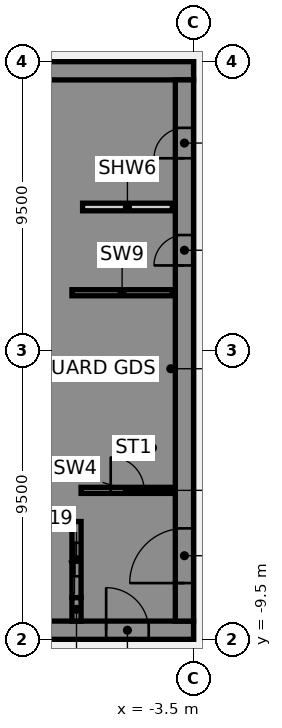
"""IFC4 building model, lengths in metres.
Left out: names, types, materials, properties, quantities, classifications, styles, units other than length and angle.
Written with IfcOpenShell. Run it as: python <this file> out.ifc"""

import sys

from ifc_helpers import new_model, si_unit, direction, frame, frame_2d, origin, place, context, subcontext, project, spatial, polyline, rectangle, outline, extrude, element, fill, save


model = new_model("IFC4")
c1 = context("Model", 3, precision=1e-05, world=origin(), true_north=direction((0.0, 1.0)))
c2 = subcontext(c1, "Body", "Model", "MODEL_VIEW")
j1 = project(units=[si_unit("LENGTHUNIT", "METRE"), si_unit("PLANEANGLEUNIT", "RADIAN")], contexts=[c1])
p1 = place(None, origin())
s1 = spatial("IfcSite", under=j1, at=p1, CompositionType="ELEMENT")
p2 = place(p1, origin())
s2 = spatial("IfcBuilding", under=s1, at=p2, CompositionType="ELEMENT")
p3 = place(p2, frame((0.0, 0.0, 83.5)))
s3 = spatial("IfcBuildingStorey", under=s2, at=p3, CompositionType="ELEMENT", Elevation=83.5)
p4 = place(p3, frame((-16.5, -9.2, 0.0), z_axis=(0.0, 0.0, 1.0), x_axis=(1.0, 0.0, 0.0)))
e1 = element("IfcWall", 1, at=p4, inside=s3, PredefinedType="SHEAR", context=c2, shape_type="SweptSolid", body=[
    extrude(rectangle(XDim=13.0, YDim=0.6, at=frame_2d((6.5, 0.0))), origin(), (0.0, 0.0, 1.0), 3.61),
])
p5 = place(p4, frame((4.15, 0.0, 0.0)))
e2 = element("IfcOpeningElement", 2, at=p5, cuts=e1, PredefinedType="OPENING", context=c2, shape_type="SweptSolid", body=[
    extrude(rectangle(XDim=1.4, YDim=2.1, at=frame_2d((0.7, 1.05))), frame((0.0, 0.31, 0.0), z_axis=(0.0, -1.0, 0.0), x_axis=(1.0, 0.0, 0.0)), (0.0, 0.0, 1.0), 0.62),
])
p6 = place(p4, frame((10.125, 0.0, 0.0)))
e3 = element("IfcOpeningElement", 3, at=p6, cuts=e1, PredefinedType="OPENING", context=c2, shape_type="SweptSolid", body=[
    extrude(rectangle(XDim=1.4, YDim=2.1, at=frame_2d((0.7, 1.05))), frame((0.0, 0.31, 0.0), z_axis=(0.0, -1.0, 0.0), x_axis=(1.0, 0.0, 0.0)), (0.0, 0.0, 1.0), 0.62),
])
p7 = place(p3, frame((-16.5, 9.2, 0.0), z_axis=(0.0, 0.0, 1.0), x_axis=(1.0, 0.0, 0.0)))
e4 = element("IfcWall", 4, at=p7, inside=s3, PredefinedType="SHEAR", context=c2, shape_type="SweptSolid", body=[
    extrude(rectangle(XDim=13.0, YDim=0.6, at=frame_2d((6.5, 0.0))), origin(), (0.0, 0.0, 1.0), 3.61),
])
p8 = place(p3, origin())
e5 = element("IfcWall", 5, at=p8, inside=s3, PredefinedType="SHEAR", context=c2, shape_type="SweptSolid", body=[
    extrude(outline(polyline([(-9.8, -5.375), (-9.8, -5.625), (-7.5, -5.625), (-7.2, -5.625), (-7.2, 8.9), (-7.5, 8.9), (-9.8, 8.9), (-9.8, 8.125), (-7.5, 8.125), (-7.5, 5.625), (-9.8, 5.625), (-9.8, 5.375), (-7.5, 5.375), (-7.5, 2.875), (-9.8, 2.875), (-9.8, 2.625), (-7.5, 2.625), (-7.5, 0.125), (-9.8, 0.125), (-9.8, -0.125), (-7.5, -0.125), (-7.5, -2.625), (-9.8, -2.625), (-9.8, -2.875), (-7.5, -2.875), (-7.5, -5.375), (-9.8, -5.375)])), origin(), (0.0, 0.0, 1.0), 3.61),
])
p9 = place(p3, origin())
e6 = element("IfcWall", 6, at=p9, inside=s3, PredefinedType="SHEAR", context=c2, shape_type="SweptSolid", body=[
    extrude(outline(polyline([(-7.5, -8.125), (-9.55, -8.125), (-9.55, -5.625), (-9.8, -5.625), (-9.8, -8.125), (-9.8, -8.9), (-7.5, -8.9), (-7.5, -8.125)])), origin(), (0.0, 0.0, 1.0), 3.61),
])
p10 = place(p3, frame((-7.35, -8.9, 0.0), z_axis=(0.0, 0.0, 1.0), x_axis=(0.0, 1.0, 0.0)))
e7 = element("IfcWall", 7, at=p10, inside=s3, PredefinedType="SHEAR", context=c2, shape_type="SweptSolid", body=[
    extrude(rectangle(XDim=0.775, YDim=0.3, at=frame_2d((0.387, 0.0))), origin(), (0.0, 0.0, 1.0), 3.61),
])
p11 = place(p3, frame((-7.5, 1.9, 0.0), z_axis=(0.0, 0.0, 1.0), x_axis=(1.0, 0.0, 0.0)))
e8 = element("IfcWall", 8, at=p11, inside=s3, PredefinedType="SHEAR", context=c2, shape_type="SweptSolid", body=[
    extrude(rectangle(XDim=3.3, YDim=0.2, at=frame_2d((1.65, 0.0))), origin(), (0.0, 0.0, 1.0), 3.61),
])
p12 = place(p3, frame((-7.35, -8.125, 0.0), z_axis=(0.0, 0.0, 1.0), x_axis=(0.0, 1.0, 0.0)))
e9 = element("IfcWall", 9, at=p12, inside=s3, PredefinedType="SHEAR", context=c2, shape_type="SweptSolid", body=[
    extrude(rectangle(XDim=2.5, YDim=0.3, at=frame_2d((1.25, 0.0))), origin(), (0.0, 0.0, 1.0), 3.61),
])
p13 = place(p12, frame((0.7, 0.0, 0.0)))
e10 = element("IfcOpeningElement", 10, at=p13, cuts=e9, PredefinedType="OPENING", context=c2, shape_type="SweptSolid", body=[
    extrude(rectangle(XDim=1.1, YDim=2.1, at=frame_2d((0.55, 1.05))), frame((0.0, 0.16, 0.0), z_axis=(0.0, -1.0, 0.0), x_axis=(1.0, 0.0, 0.0)), (0.0, 0.0, 1.0), 0.32),
])
p14 = place(p3, frame((-3.8, -8.9, 0.0), z_axis=(0.0, 0.0, 1.0), x_axis=(0.0, 1.0, 0.0)))
e11 = element("IfcWall", 11, at=p14, inside=s3, PredefinedType="SHEAR", context=c2, shape_type="SweptSolid", body=[
    extrude(rectangle(XDim=17.8, YDim=0.6, at=frame_2d((8.9, 0.0))), origin(), (0.0, 0.0, 1.0), 3.61),
])
p15 = place(p14, frame((1.25, 0.0, 0.0)))
e12 = element("IfcOpeningElement", 12, at=p15, cuts=e11, PredefinedType="OPENING", context=c2, shape_type="SweptSolid", body=[
    extrude(rectangle(XDim=1.8, YDim=2.1, at=frame_2d((0.9, 1.05))), frame((0.0, 0.31, 0.0), z_axis=(0.0, -1.0, 0.0), x_axis=(1.0, 0.0, 0.0)), (0.0, 0.0, 1.0), 0.62),
])
p16 = place(p14, frame((11.698, 0.0, 0.0)))
e13 = element("IfcOpeningElement", 13, at=p16, cuts=e11, PredefinedType="OPENING", context=c2, shape_type="SweptSolid", body=[
    extrude(rectangle(XDim=1.0, YDim=2.1, at=frame_2d((0.5, 1.05))), frame((0.0, 0.31, 0.0), z_axis=(0.0, -1.0, 0.0), x_axis=(1.0, 0.0, 0.0)), (0.0, 0.0, 1.0), 0.62),
])
p17 = place(p14, frame((15.222, 0.0, 0.0)))
e14 = element("IfcOpeningElement", 14, at=p17, cuts=e11, PredefinedType="OPENING", context=c2, shape_type="SweptSolid", body=[
    extrude(rectangle(XDim=1.0, YDim=2.1, at=frame_2d((0.5, 1.05))), frame((0.0, 0.31, 0.0), z_axis=(0.0, -1.0, 0.0), x_axis=(1.0, 0.0, 0.0)), (0.0, 0.0, 1.0), 0.62),
])
p18 = place(p3, frame((-7.15, 4.72, 0.0), z_axis=(0.0, 0.0, 1.0), x_axis=(1.0, 0.0, 0.0)))
e15 = element("IfcWall", 15, at=p18, inside=s3, PredefinedType="PARTITIONING", context=c2, shape_type="SweptSolid", body=[
    extrude(rectangle(XDim=2.95, YDim=0.25, at=frame_2d((1.475, 0.0))), origin(), (0.0, 0.0, 1.0), 3.61),
])
p19 = place(p3, frame((-7.2, -4.6, 0.0), z_axis=(0.0, 0.0, 1.0), x_axis=(1.0, 0.0, 0.0)))
e16 = element("IfcWall", 16, at=p19, inside=s3, PredefinedType="SHEAR", context=c2, shape_type="SweptSolid", body=[
    extrude(rectangle(XDim=3.1, YDim=0.2, at=frame_2d((1.55, 0.0))), origin(), (0.0, 0.0, 1.0), 3.61),
])
p20 = place(p19, frame((0.975, 0.0, 0.0)))
e17 = element("IfcOpeningElement", 17, at=p20, cuts=e16, PredefinedType="OPENING", context=c2, shape_type="SweptSolid", body=[
    extrude(rectangle(XDim=1.1, YDim=2.1, at=frame_2d((0.55, 1.05))), frame((0.0, 0.11, 0.0), z_axis=(0.0, -1.0, 0.0), x_axis=(1.0, 0.0, 0.0)), (0.0, 0.0, 1.0), 0.22),
])
p21 = place(p6, origin())
e18 = element("IfcDoor", 18, at=p21, inside=s3, OperationType="SINGLE_SWING_LEFT", PredefinedType="DOOR", context=c2, shape_type="SweptSolid", body=[
    extrude(rectangle(XDim=1.4, YDim=2.1, at=frame_2d((0.7, 1.05))), frame((0.0, 0.025, 0.0), z_axis=(0.0, -1.0, 0.0), x_axis=(1.0, 0.0, 0.0)), (0.0, 0.0, 1.0), 0.05),
])
fill(e3, e18)
p22 = place(p15, origin())
e19 = element("IfcDoor", 19, at=p22, inside=s3, OperationType="SINGLE_SWING_LEFT", PredefinedType="DOOR", context=c2, shape_type="SweptSolid", body=[
    extrude(rectangle(XDim=1.8, YDim=2.1, at=frame_2d((0.9, 1.05))), frame((0.0, 0.025, 0.0), z_axis=(0.0, -1.0, 0.0), x_axis=(1.0, 0.0, 0.0)), (0.0, 0.0, 1.0), 0.05),
])
fill(e12, e19)
p23 = place(p16, origin())
e20 = element("IfcDoor", 20, at=p23, inside=s3, OperationType="SINGLE_SWING_LEFT", PredefinedType="DOOR", context=c2, shape_type="SweptSolid", body=[
    extrude(rectangle(XDim=1.0, YDim=2.1, at=frame_2d((0.5, 1.05))), frame((0.0, 0.275, 0.0), z_axis=(0.0, -1.0, 0.0), x_axis=(1.0, 0.0, 0.0)), (0.0, 0.0, 1.0), 0.05),
])
fill(e13, e20)
p24 = place(p17, origin())
e21 = element("IfcDoor", 21, at=p24, inside=s3, OperationType="SINGLE_SWING_LEFT", PredefinedType="DOOR", context=c2, shape_type="SweptSolid", body=[
    extrude(rectangle(XDim=1.0, YDim=2.1, at=frame_2d((0.5, 1.05))), frame((0.0, 0.275, 0.0), z_axis=(0.0, -1.0, 0.0), x_axis=(1.0, 0.0, 0.0)), (0.0, 0.0, 1.0), 0.05),
])
fill(e14, e21)
p25 = place(p20, origin())
e22 = element("IfcDoor", 22, at=p25, inside=s3, OperationType="SINGLE_SWING_LEFT", PredefinedType="DOOR", context=c2, shape_type="SweptSolid", body=[
    extrude(rectangle(XDim=1.1, YDim=2.1, at=frame_2d((0.55, 1.05))), frame((0.0, 0.025, 0.0), z_axis=(0.0, -1.0, 0.0), x_axis=(1.0, 0.0, 0.0)), (0.0, 0.0, 1.0), 0.05),
])
fill(e17, e22)
p26 = place(p13, origin())
e23 = element("IfcDoor", 23, at=p26, inside=s3, OperationType="SLIDING_TO_LEFT", PredefinedType="DOOR", context=c2, shape_type="SweptSolid", body=[
    extrude(rectangle(XDim=1.1, YDim=2.1, at=frame_2d((0.55, 1.05))), frame((0.0, 0.025, 0.0), z_axis=(0.0, -1.0, 0.0), x_axis=(1.0, 0.0, 0.0)), (0.0, 0.0, 1.0), 0.05),
])
fill(e10, e23)
save(model, sys.argv[1])
